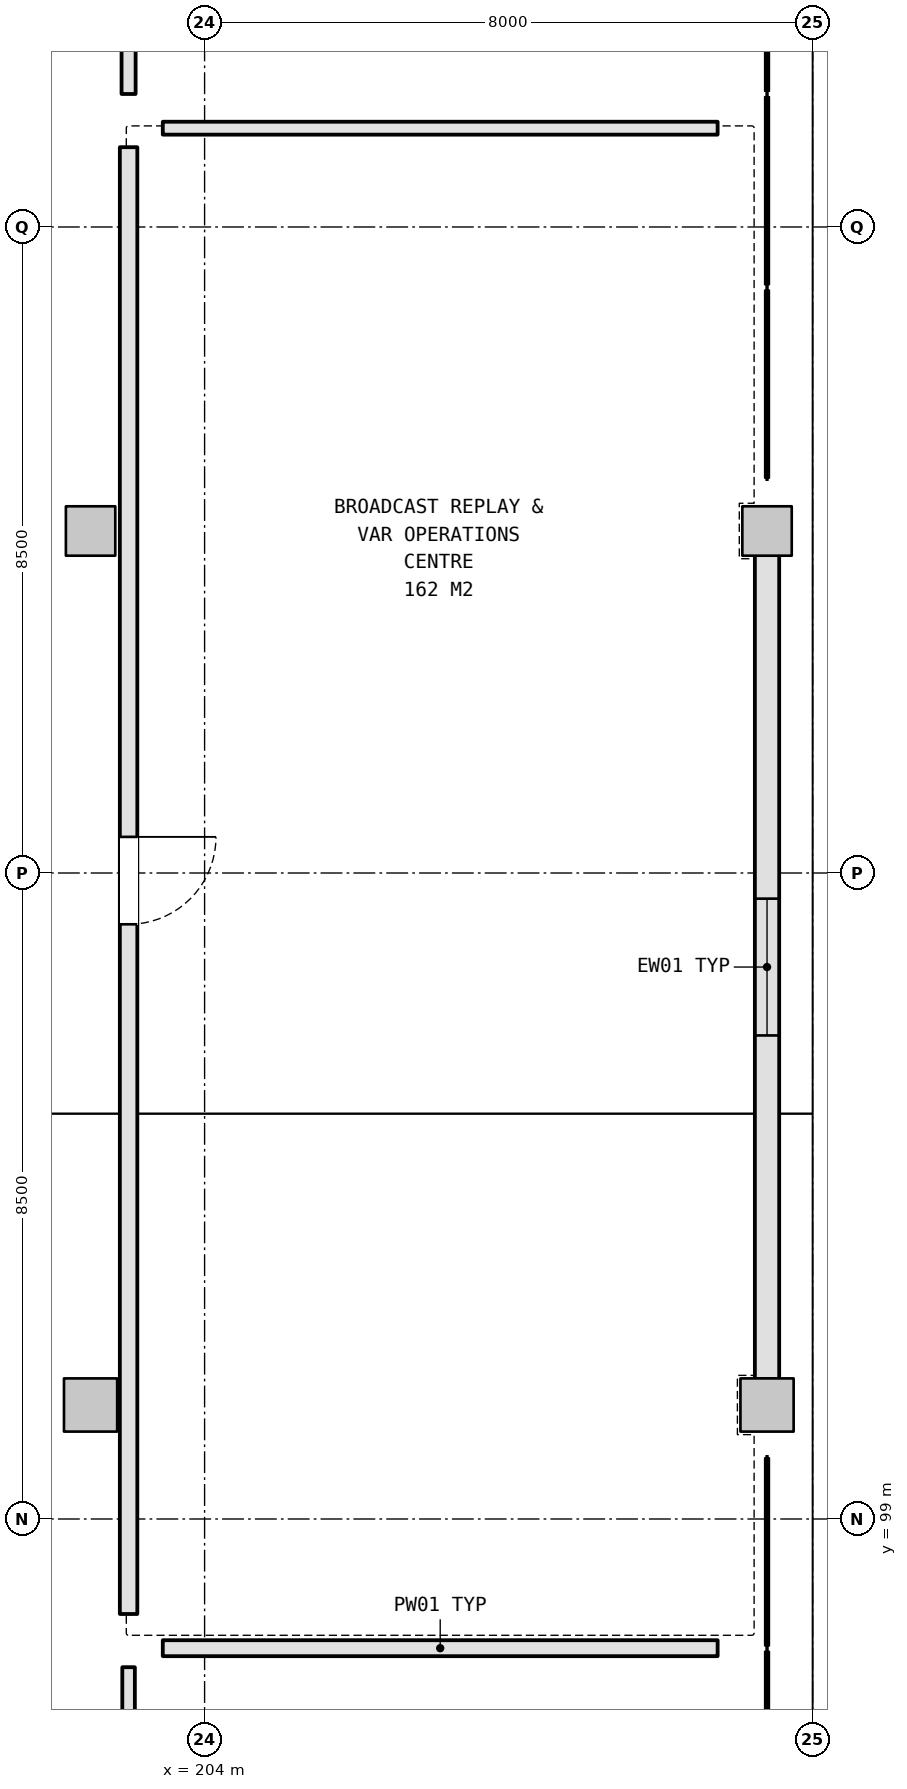
"""IFC4 building model, lengths in metres.
Left out: names, types, materials, properties, quantities, classifications, styles, units other than length and angle.
Written with IfcOpenShell. Run it as: python <this file> out.ifc"""

import sys

from ifc_helpers import new_model, si_unit, direction, frame, frame_2d, origin, origin_2d, place, context, subcontext, project, spatial, rectangle, extrude, element, fill, save


model = new_model("IFC4")
c1 = context("Model", 3, precision=1e-05, world=origin(), true_north=direction((0.0, 1.0)))
c2 = subcontext(c1, "Body", "Model", "MODEL_VIEW")
j1 = project(units=[si_unit("LENGTHUNIT", "METRE"), si_unit("PLANEANGLEUNIT", "RADIAN")], contexts=[c1])
p1 = place(None, origin())
s1 = spatial("IfcSite", under=j1, at=p1, CompositionType="ELEMENT")
p2 = place(p1, origin())
s2 = spatial("IfcBuilding", under=s1, at=p2, CompositionType="ELEMENT")
p3 = place(p2, frame((0.0, 0.0, 10.8)))
s3 = spatial("IfcBuildingStorey", under=s2, at=p3, CompositionType="ELEMENT", Elevation=10.8)
p4 = place(p3, frame((202.5, 100.5, 0.0), z_axis=(0.0, 0.0, 1.0), x_axis=(1.0, 0.0, 0.0)))
e1 = element("IfcColumn", 1, at=p4, inside=s3, PredefinedType="COLUMN", context=c2, shape_type="SweptSolid", body=[
    extrude(rectangle(XDim=0.7, YDim=0.7, at=origin_2d()), origin(), (0.0, 0.0, 1.0), 5.4),
])
p5 = place(p3, frame((202.5, 112.0, 0.0), z_axis=(0.0, 0.0, 1.0), x_axis=(1.0, 0.0, 0.0)))
e2 = element("IfcColumn", 2, at=p5, inside=s3, PredefinedType="COLUMN", context=c2, shape_type="SweptSolid", body=[
    extrude(rectangle(XDim=0.65, YDim=0.65, at=origin_2d()), origin(), (0.0, 0.0, 1.0), 5.4),
])
p6 = place(p3, frame((211.4, 100.5, 0.0), z_axis=(0.0, 0.0, 1.0), x_axis=(1.0, 0.0, 0.0)))
e3 = element("IfcColumn", 3, at=p6, inside=s3, PredefinedType="COLUMN", context=c2, shape_type="SweptSolid", body=[
    extrude(rectangle(XDim=0.7, YDim=0.7, at=origin_2d()), origin(), (0.0, 0.0, 1.0), 5.4),
])
p7 = place(p3, frame((211.4, 112.0, 0.0), z_axis=(0.0, 0.0, 1.0), x_axis=(1.0, 0.0, 0.0)))
e4 = element("IfcColumn", 4, at=p7, inside=s3, PredefinedType="COLUMN", context=c2, shape_type="SweptSolid", body=[
    extrude(rectangle(XDim=0.65, YDim=0.65, at=origin_2d()), origin(), (0.0, 0.0, 1.0), 5.4),
])
p8 = place(p3, frame((211.4, 100.838, 0.0), z_axis=(0.0, 0.0, 1.0), x_axis=(0.0, 1.0, 0.0)))
e5 = element("IfcWall", 5, at=p8, inside=s3, PredefinedType="SOLIDWALL", context=c2, shape_type="SweptSolid", body=[
    extrude(rectangle(XDim=10.849, YDim=0.32, at=frame_2d((5.425, 0.0))), origin(), (0.0, 0.0, 1.0), 4.455),
])
p9 = place(p8, frame((4.524, 0.0, 1.2)))
e6 = element("IfcOpeningElement", 6, at=p9, cuts=e5, PredefinedType="OPENING", context=c2, shape_type="SweptSolid", body=[
    extrude(rectangle(XDim=1.8, YDim=1.6, at=frame_2d((0.9, 0.8))), frame((0.0, 0.17, 0.0), z_axis=(0.0, -1.0, 0.0), x_axis=(1.0, 0.0, 0.0)), (0.0, 0.0, 1.0), 0.34),
])
p10 = place(p3, frame((203.0, 73.75, 0.0), z_axis=(0.0, 0.0, 1.0), x_axis=(0.0, 1.0, 0.0)))
e7 = element("IfcWall", 7, at=p10, inside=s3, PredefinedType="PARTITIONING", context=c2, shape_type="SweptSolid", body=[
    extrude(rectangle(XDim=23.3, YDim=0.165, at=frame_2d((11.65, 0.0))), origin(), (0.0, 0.0, 1.0), 4.605),
])
p11 = place(p10, frame((10.875, 0.0, 0.0)))
e8 = element("IfcOpeningElement", 8, at=p11, cuts=e7, PredefinedType="OPENING", context=c2, shape_type="SweptSolid", body=[
    extrude(rectangle(XDim=1.55, YDim=2.15, at=frame_2d((0.775, 1.075))), frame((0.0, 0.093, 0.0), z_axis=(0.0, -1.0, 0.0), x_axis=(1.0, 0.0, 0.0)), (0.0, 0.0, 1.0), 0.185),
])
p12 = place(p3, frame((203.45, 97.3, 0.0), z_axis=(0.0, 0.0, 1.0), x_axis=(1.0, 0.0, 0.0)))
e9 = element("IfcWall", 9, at=p12, inside=s3, PredefinedType="PLUMBINGWALL", context=c2, shape_type="SweptSolid", body=[
    extrude(rectangle(XDim=7.3, YDim=0.21, at=frame_2d((3.65, 0.0))), origin(), (0.0, 0.0, 1.0), 5.12),
])
p13 = place(p3, frame((203.0, 97.75, 0.0), z_axis=(0.0, 0.0, 1.0), x_axis=(0.0, 1.0, 0.0)))
e10 = element("IfcWall", 10, at=p13, inside=s3, PredefinedType="PLUMBINGWALL", context=c2, shape_type="SweptSolid", body=[
    extrude(rectangle(XDim=19.3, YDim=0.23, at=frame_2d((9.65, 0.0))), origin(), (0.0, 0.0, 1.0), 4.605),
])
p14 = place(p13, frame((9.075, 0.0, 0.0)))
e11 = element("IfcOpeningElement", 11, at=p14, cuts=e10, PredefinedType="OPENING", context=c2, shape_type="SweptSolid", body=[
    extrude(rectangle(XDim=1.15, YDim=2.2, at=frame_2d((0.575, 1.1))), frame((0.0, 0.125, 0.0), z_axis=(0.0, -1.0, 0.0), x_axis=(1.0, 0.0, 0.0)), (0.0, 0.0, 1.0), 0.25),
])
p15 = place(p3, frame((203.45, 117.3, 0.0), z_axis=(0.0, 0.0, 1.0), x_axis=(1.0, 0.0, 0.0)))
e12 = element("IfcWall", 12, at=p15, inside=s3, PredefinedType="PARTITIONING", context=c2, shape_type="SweptSolid", body=[
    extrude(rectangle(XDim=7.3, YDim=0.17, at=frame_2d((3.65, 0.0))), origin(), (0.0, 0.0, 1.0), 5.12),
])
p16 = place(p3, frame((203.0, 117.75, 0.0), z_axis=(0.0, 0.0, 1.0), x_axis=(0.0, 1.0, 0.0)))
e13 = element("IfcWall", 13, at=p16, inside=s3, PredefinedType="PARTITIONING", context=c2, shape_type="SweptSolid", body=[
    extrude(rectangle(XDim=13.3, YDim=0.185, at=frame_2d((6.65, 0.0))), origin(), (0.0, 0.0, 1.0), 4.605),
])
p17 = place(p16, frame((6.5, 0.0, 0.0)))
e14 = element("IfcOpeningElement", 14, at=p17, cuts=e13, PredefinedType="OPENING", context=c2, shape_type="SweptSolid", body=[
    extrude(rectangle(XDim=1.1, YDim=2.15, at=frame_2d((0.55, 1.075))), frame((0.0, 0.103, 0.0), z_axis=(0.0, -1.0, 0.0), x_axis=(1.0, 0.0, 0.0)), (0.0, 0.0, 1.0), 0.205),
])
p18 = place(p9, origin())
e15 = element("IfcWindow", 15, at=p18, inside=s3, PartitioningType="SINGLE_PANEL", PredefinedType="WINDOW", context=c2, shape_type="SweptSolid", body=[
    extrude(rectangle(XDim=1.8, YDim=1.6, at=frame_2d((0.9, 0.8))), frame((0.0, 0.03, 0.0), z_axis=(0.0, -1.0, 0.0), x_axis=(1.0, 0.0, 0.0)), (0.0, 0.0, 1.0), 0.06),
])
fill(e6, e15)
p19 = place(p14, frame((1.15, 0.0, 0.0), z_axis=(0.0, 0.0, 1.0), x_axis=(-1.0, 0.0, 0.0)))
e16 = element("IfcDoor", 16, at=p19, inside=s3, OperationType="SINGLE_SWING_RIGHT", PredefinedType="DOOR", context=c2, shape_type="SweptSolid", body=[
    extrude(rectangle(XDim=1.15, YDim=2.2, at=frame_2d((0.575, 1.1))), frame((0.0, 0.025, 0.0), z_axis=(0.0, -1.0, 0.0), x_axis=(1.0, 0.0, 0.0)), (0.0, 0.0, 1.0), 0.05),
])
fill(e11, e16)
save(model, sys.argv[1])
